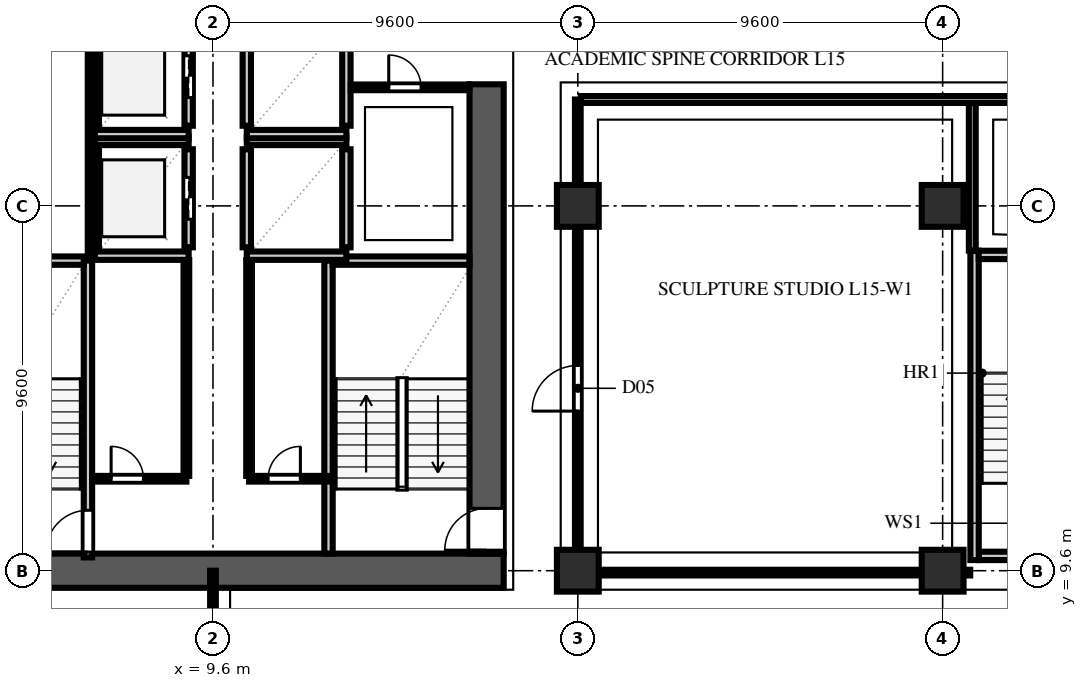
"""IFC4 building model, lengths in metres.
Left out: names, types, materials, properties, quantities, classifications, styles, units other than length and angle.
Written with IfcOpenShell. Run it as: python <this file> out.ifc"""

import sys

from ifc_helpers import new_model, si_unit, direction, frame, frame_2d, origin, origin_2d, place, context, subcontext, project, spatial, rectangle, extrude, element, fill, save


model = new_model("IFC4")
c1 = context("Model", 3, precision=1e-05, world=origin(), true_north=direction((0.0, 1.0)))
c2 = subcontext(c1, "Body", "Model", "MODEL_VIEW")
j1 = project(units=[si_unit("LENGTHUNIT", "METRE"), si_unit("PLANEANGLEUNIT", "RADIAN")], contexts=[c1])
p1 = place(None, origin())
s1 = spatial("IfcSite", under=j1, at=p1, CompositionType="ELEMENT")
p2 = place(p1, origin())
s2 = spatial("IfcBuilding", under=s1, at=p2, CompositionType="ELEMENT")
p3 = place(p2, frame((0.0, 0.0, 62.2)))
s3 = spatial("IfcBuildingStorey", under=s2, at=p3, CompositionType="ELEMENT", Elevation=62.2)
p4 = place(p3, frame((2.65, 9.6, 0.0), z_axis=(0.0, 0.0, 1.0), x_axis=(1.0, 0.0, 0.0)))
e1 = element("IfcWall", 1, at=p4, inside=s3, PredefinedType="SHEAR", context=c2, shape_type="SweptSolid", body=[
    extrude(rectangle(XDim=14.6, YDim=0.9, at=frame_2d((7.3, 0.0))), origin(), (0.0, 0.0, 1.0), 3.54),
])
p5 = place(p3, frame((16.8, 10.05, 0.0), z_axis=(0.0, 0.0, 1.0), x_axis=(0.0, 1.0, 0.0)))
e2 = element("IfcWall", 2, at=p5, inside=s3, PredefinedType="SHEAR", context=c2, shape_type="SweptSolid", body=[
    extrude(rectangle(XDim=12.35, YDim=0.9, at=frame_2d((6.175, 0.0))), origin(), (0.0, 0.0, 1.0), 3.54),
])
p6 = place(p5, frame((0.09, 0.0, 0.0)))
e3 = element("IfcOpeningElement", 3, at=p6, cuts=e2, PredefinedType="OPENING", context=c2, shape_type="SweptSolid", body=[
    extrude(rectangle(XDim=1.1, YDim=2.2, at=frame_2d((0.55, 1.1))), frame((0.0, 0.462, 0.0), z_axis=(0.0, -1.0, 0.0), x_axis=(1.0, 0.0, 0.0)), (0.0, 0.0, 1.0), 0.924),
])
for number, where, z_axis, x_axis in (
    (4, (19.2, 9.6, 0.0), (0.0, 0.0, 1.0), (1.0, 0.0, 0.0)),
    (5, (19.2, 19.2, 0.0), (0.0, 0.0, 1.0), (1.0, 0.0, 0.0)),
    (6, (28.8, 9.6, 0.0), (0.0, 0.0, 1.0), (1.0, 0.0, 0.0)),
    (7, (28.8, 19.2, 0.0), (0.0, 0.0, 1.0), (1.0, 0.0, 0.0)),
):
    element("IfcColumn", number, at=place(p3, frame(where, z_axis=z_axis, x_axis=x_axis)), inside=s3, PredefinedType="COLUMN", context=c2, shape_type="SweptSolid", body=[
        extrude(rectangle(XDim=1.1, YDim=1.1, at=origin_2d()), origin(), (0.0, 0.0, 1.0), 3.8),
    ])
p7 = place(p3, frame((6.31, 9.95, 0.0), z_axis=(0.0, 0.0, 1.0), x_axis=(0.0, 1.0, 0.0)))
e8 = element("IfcWall", 8, at=p7, inside=s3, PredefinedType="SOLIDWALL", context=c2, shape_type="SweptSolid", body=[
    extrude(rectangle(XDim=7.81, YDim=0.22, at=frame_2d((3.905, 0.0))), origin(), (0.0, 0.0, 1.0), 3.54),
])
p8 = place(p7, frame((0.14, 0.0, 0.0)))
e9 = element("IfcOpeningElement", 9, at=p8, cuts=e8, PredefinedType="OPENING", context=c2, shape_type="SweptSolid", body=[
    extrude(rectangle(XDim=1.1, YDim=2.2, at=frame_2d((0.55, 1.1))), frame((0.0, 0.122, 0.0), z_axis=(0.0, -1.0, 0.0), x_axis=(1.0, 0.0, 0.0)), (0.0, 0.0, 1.0), 0.244),
])
p9 = place(p3, frame((2.65, 17.76, 0.0), z_axis=(0.0, 0.0, 1.0), x_axis=(1.0, 0.0, 0.0)))
e10 = element("IfcWall", 10, at=p9, inside=s3, PredefinedType="SOLIDWALL", context=c2, shape_type="SweptSolid", body=[
    extrude(rectangle(XDim=3.55, YDim=0.22, at=frame_2d((1.775, 0.0))), origin(), (0.0, 0.0, 1.0), 3.54),
])
p10 = place(p3, frame((12.64, 10.05, 0.0), z_axis=(0.0, 0.0, 1.0), x_axis=(0.0, 1.0, 0.0)))
e11 = element("IfcWall", 11, at=p10, inside=s3, PredefinedType="SOLIDWALL", context=c2, shape_type="SweptSolid", body=[
    extrude(rectangle(XDim=7.71, YDim=0.22, at=frame_2d((3.855, 0.0))), origin(), (0.0, 0.0, 1.0), 3.54),
])
p11 = place(p3, frame((12.75, 17.76, 0.0), z_axis=(0.0, 0.0, 1.0), x_axis=(1.0, 0.0, 0.0)))
e12 = element("IfcWall", 12, at=p11, inside=s3, PredefinedType="SOLIDWALL", context=c2, shape_type="SweptSolid", body=[
    extrude(rectangle(XDim=3.6, YDim=0.22, at=frame_2d((1.8, 0.0))), origin(), (0.0, 0.0, 1.0), 3.54),
])
p12 = place(p3, frame((29.75, 9.99, 0.0), z_axis=(0.0, 0.0, 1.0), x_axis=(1.0, 0.0, 0.0)))
e13 = element("IfcWall", 13, at=p12, inside=s3, PredefinedType="SOLIDWALL", context=c2, shape_type="SweptSolid", body=[
    extrude(rectangle(XDim=3.65, YDim=0.22, at=frame_2d((1.825, 0.0))), origin(), (0.0, 0.0, 1.0), 3.54),
])
p13 = place(p12, frame((1.24, 0.0, 0.0)))
e14 = element("IfcOpeningElement", 14, at=p13, cuts=e13, PredefinedType="OPENING", context=c2, shape_type="SweptSolid", body=[
    extrude(rectangle(XDim=1.1, YDim=2.2, at=frame_2d((0.55, 1.1))), frame((0.0, 0.122, 0.0), z_axis=(0.0, -1.0, 0.0), x_axis=(1.0, 0.0, 0.0)), (0.0, 0.0, 1.0), 0.244),
])
p14 = place(p3, frame((29.64, 9.88, 0.0), z_axis=(0.0, 0.0, 1.0), x_axis=(0.0, 1.0, 0.0)))
e15 = element("IfcWall", 15, at=p14, inside=s3, PredefinedType="SOLIDWALL", context=c2, shape_type="SweptSolid", body=[
    extrude(rectangle(XDim=8.14, YDim=0.22, at=frame_2d((4.07, 0.0))), origin(), (0.0, 0.0, 1.0), 3.54),
])
p15 = place(p3, frame((29.75, 17.91, 0.0), z_axis=(0.0, 0.0, 1.0), x_axis=(1.0, 0.0, 0.0)))
e16 = element("IfcWall", 16, at=p15, inside=s3, PredefinedType="SOLIDWALL", context=c2, shape_type="SweptSolid", body=[
    extrude(rectangle(XDim=3.65, YDim=0.22, at=frame_2d((1.825, 0.0))), origin(), (0.0, 0.0, 1.0), 3.54),
])
p16 = place(p3, frame((6.49, 18.11, 0.0), z_axis=(0.0, 0.0, 1.0), x_axis=(0.0, 1.0, 0.0)))
e17 = element("IfcWall", 17, at=p16, inside=s3, PredefinedType="SOLIDWALL", context=c2, shape_type="SweptSolid", body=[
    extrude(rectangle(XDim=2.58, YDim=0.22, at=frame_2d((1.29, 0.0))), origin(), (0.0, 0.0, 1.0), 3.54),
])
p17 = place(p3, frame((8.96, 18.11, 0.0), z_axis=(0.0, 0.0, 1.0), x_axis=(0.0, 1.0, 0.0)))
e18 = element("IfcWall", 18, at=p17, inside=s3, PredefinedType="SOLIDWALL", context=c2, shape_type="SweptSolid", body=[
    extrude(rectangle(XDim=2.58, YDim=0.22, at=frame_2d((1.29, 0.0))), origin(), (0.0, 0.0, 1.0), 3.54),
])
p18 = place(p17, frame((0.74, 0.0, 0.0)))
e19 = element("IfcOpeningElement", 19, at=p18, cuts=e18, PredefinedType="OPENING", context=c2, shape_type="SweptSolid", body=[
    extrude(rectangle(XDim=1.1, YDim=2.2, at=frame_2d((0.55, 1.1))), frame((0.0, 0.122, 0.0), z_axis=(0.0, -1.0, 0.0), x_axis=(1.0, 0.0, 0.0)), (0.0, 0.0, 1.0), 0.244),
])
for number, where, z_axis, x_axis in (
    (20, (6.49, 17.89, 0.0), (0.0, 0.0, 1.0), (1.0, 0.0, 0.0)),
    (21, (6.49, 20.91, 0.0), (0.0, 0.0, 1.0), (1.0, 0.0, 0.0)),
):
    element("IfcWall", number, at=place(p3, frame(where, z_axis=z_axis, x_axis=x_axis)), inside=s3, PredefinedType="SOLIDWALL", context=c2, shape_type="SweptSolid", body=[
        extrude(rectangle(XDim=2.47, YDim=0.22, at=frame_2d((1.235, 0.0))), origin(), (0.0, 0.0, 1.0), 3.54),
    ])
p19 = place(p3, frame((6.49, 21.31, 0.0), z_axis=(0.0, 0.0, 1.0), x_axis=(0.0, 1.0, 0.0)))
e22 = element("IfcWall", 22, at=p19, inside=s3, PredefinedType="SOLIDWALL", context=c2, shape_type="SweptSolid", body=[
    extrude(rectangle(XDim=2.58, YDim=0.22, at=frame_2d((1.29, 0.0))), origin(), (0.0, 0.0, 1.0), 3.54),
])
p20 = place(p3, frame((8.96, 21.31, 0.0), z_axis=(0.0, 0.0, 1.0), x_axis=(0.0, 1.0, 0.0)))
e23 = element("IfcWall", 23, at=p20, inside=s3, PredefinedType="SOLIDWALL", context=c2, shape_type="SweptSolid", body=[
    extrude(rectangle(XDim=2.58, YDim=0.22, at=frame_2d((1.29, 0.0))), origin(), (0.0, 0.0, 1.0), 3.54),
])
p21 = place(p20, frame((0.74, 0.0, 0.0)))
e24 = element("IfcOpeningElement", 24, at=p21, cuts=e23, PredefinedType="OPENING", context=c2, shape_type="SweptSolid", body=[
    extrude(rectangle(XDim=1.1, YDim=2.2, at=frame_2d((0.55, 1.1))), frame((0.0, 0.122, 0.0), z_axis=(0.0, -1.0, 0.0), x_axis=(1.0, 0.0, 0.0)), (0.0, 0.0, 1.0), 0.244),
])
p22 = place(p3, frame((6.49, 21.09, 0.0), z_axis=(0.0, 0.0, 1.0), x_axis=(1.0, 0.0, 0.0)))
e25 = element("IfcWall", 25, at=p22, inside=s3, PredefinedType="SOLIDWALL", context=c2, shape_type="SweptSolid", body=[
    extrude(rectangle(XDim=2.47, YDim=0.22, at=frame_2d((1.235, 0.0))), origin(), (0.0, 0.0, 1.0), 3.54),
])
for number, where, z_axis, x_axis in (
    (26, (10.49, 18.11, 0.0), (0.0, 0.0, 1.0), (0.0, 1.0, 0.0)),
    (27, (13.11, 18.11, 0.0), (0.0, 0.0, 1.0), (0.0, 1.0, 0.0)),
):
    element("IfcWall", number, at=place(p3, frame(where, z_axis=z_axis, x_axis=x_axis)), inside=s3, PredefinedType="SOLIDWALL", context=c2, shape_type="SweptSolid", body=[
        extrude(rectangle(XDim=2.58, YDim=0.22, at=frame_2d((1.29, 0.0))), origin(), (0.0, 0.0, 1.0), 3.54),
    ])
for number, where, z_axis, x_axis in (
    (28, (10.49, 17.89, 0.0), (0.0, 0.0, 1.0), (1.0, 0.0, 0.0)),
    (29, (10.49, 20.91, 0.0), (0.0, 0.0, 1.0), (1.0, 0.0, 0.0)),
):
    element("IfcWall", number, at=place(p3, frame(where, z_axis=z_axis, x_axis=x_axis)), inside=s3, PredefinedType="SOLIDWALL", context=c2, shape_type="SweptSolid", body=[
        extrude(rectangle(XDim=2.62, YDim=0.22, at=frame_2d((1.31, 0.0))), origin(), (0.0, 0.0, 1.0), 3.54),
    ])
for number, where, z_axis, x_axis in (
    (30, (10.49, 21.31, 0.0), (0.0, 0.0, 1.0), (0.0, 1.0, 0.0)),
    (31, (13.11, 21.31, 0.0), (0.0, 0.0, 1.0), (0.0, 1.0, 0.0)),
):
    element("IfcWall", number, at=place(p3, frame(where, z_axis=z_axis, x_axis=x_axis)), inside=s3, PredefinedType="SOLIDWALL", context=c2, shape_type="SweptSolid", body=[
        extrude(rectangle(XDim=2.58, YDim=0.22, at=frame_2d((1.29, 0.0))), origin(), (0.0, 0.0, 1.0), 3.54),
    ])
p23 = place(p3, frame((10.49, 21.09, 0.0), z_axis=(0.0, 0.0, 1.0), x_axis=(1.0, 0.0, 0.0)))
e32 = element("IfcWall", 32, at=p23, inside=s3, PredefinedType="SOLIDWALL", context=c2, shape_type="SweptSolid", body=[
    extrude(rectangle(XDim=2.62, YDim=0.22, at=frame_2d((1.31, 0.0))), origin(), (0.0, 0.0, 1.0), 3.54),
])
p24 = place(p3, frame((6.42, 12.02, 0.0), z_axis=(0.0, 0.0, 1.0), x_axis=(1.0, 0.0, 0.0)))
e33 = element("IfcWall", 33, at=p24, inside=s3, PredefinedType="PARTITIONING", context=c2, shape_type="SweptSolid", body=[
    extrude(rectangle(XDim=2.48, YDim=0.15, at=frame_2d((1.24, 0.0))), origin(), (0.0, 0.0, 1.0), 3.54),
])
p25 = place(p24, frame((0.5, 0.0, 0.0)))
e34 = element("IfcOpeningElement", 34, at=p25, cuts=e33, PredefinedType="OPENING", context=c2, shape_type="SweptSolid", body=[
    extrude(rectangle(XDim=0.85, YDim=2.1, at=frame_2d((0.425, 1.05))), frame((0.0, 0.087, 0.0), z_axis=(0.0, -1.0, 0.0), x_axis=(1.0, 0.0, 0.0)), (0.0, 0.0, 1.0), 0.174),
])
p26 = place(p3, frame((10.55, 12.02, 0.0), z_axis=(0.0, 0.0, 1.0), x_axis=(1.0, 0.0, 0.0)))
e35 = element("IfcWall", 35, at=p26, inside=s3, PredefinedType="PARTITIONING", context=c2, shape_type="SweptSolid", body=[
    extrude(rectangle(XDim=2.08, YDim=0.15, at=frame_2d((1.04, 0.0))), origin(), (0.0, 0.0, 1.0), 3.54),
])
p27 = place(p26, frame((0.5, 0.0, 0.0)))
e36 = element("IfcOpeningElement", 36, at=p27, cuts=e35, PredefinedType="OPENING", context=c2, shape_type="SweptSolid", body=[
    extrude(rectangle(XDim=0.85, YDim=2.1, at=frame_2d((0.425, 1.05))), frame((0.0, 0.087, 0.0), z_axis=(0.0, -1.0, 0.0), x_axis=(1.0, 0.0, 0.0)), (0.0, 0.0, 1.0), 0.174),
])
for number, where, z_axis, x_axis in (
    (37, (8.9, 12.095, 0.0), (0.0, 0.0, 1.0), (0.0, 1.0, 0.0)),
    (38, (10.55, 12.095, 0.0), (0.0, 0.0, 1.0), (0.0, 1.0, 0.0)),
):
    element("IfcWall", number, at=place(p3, frame(where, z_axis=z_axis, x_axis=x_axis)), inside=s3, PredefinedType="PARTITIONING", context=c2, shape_type="SweptSolid", body=[
        extrude(rectangle(XDim=5.68, YDim=0.15, at=frame_2d((2.84, 0.0))), origin(), (0.0, 0.0, 1.0), 3.54),
    ])
p28 = place(p3, frame((13.225, 22.32, 0.0), z_axis=(0.0, 0.0, 1.0), x_axis=(1.0, 0.0, 0.0)))
e39 = element("IfcWall", 39, at=p28, inside=s3, PredefinedType="PARTITIONING", context=c2, shape_type="SweptSolid", body=[
    extrude(rectangle(XDim=3.12, YDim=0.15, at=frame_2d((1.56, 0.0))), origin(), (0.0, 0.0, 1.0), 3.54),
])
p29 = place(p28, frame((1.0, 0.0, 0.0)))
e40 = element("IfcOpeningElement", 40, at=p29, cuts=e39, PredefinedType="OPENING", context=c2, shape_type="SweptSolid", body=[
    extrude(rectangle(XDim=0.85, YDim=2.1, at=frame_2d((0.425, 1.05))), frame((0.0, 0.087, 0.0), z_axis=(0.0, -1.0, 0.0), x_axis=(1.0, 0.0, 0.0)), (0.0, 0.0, 1.0), 0.174),
])
p30 = place(p3, frame((6.38, 17.8, 0.0), z_axis=(0.0, 0.0, 1.0), x_axis=(0.0, 1.0, 0.0)))
e41 = element("IfcWall", 41, at=p30, inside=s3, PredefinedType="PARTITIONING", context=c2, shape_type="SweptSolid", body=[
    extrude(rectangle(XDim=18.98, YDim=0.15, at=frame_2d((9.49, 0.0))), origin(), (0.0, 0.0, 1.0), 3.54),
])
p31 = place(p30, frame((14.3, 0.0, 0.0)))
e42 = element("IfcOpeningElement", 42, at=p31, cuts=e41, PredefinedType="OPENING", context=c2, shape_type="SweptSolid", body=[
    extrude(rectangle(XDim=0.85, YDim=2.1, at=frame_2d((0.425, 1.05))), frame((0.0, 0.087, 0.0), z_axis=(0.0, -1.0, 0.0), x_axis=(1.0, 0.0, 0.0)), (0.0, 0.0, 1.0), 0.174),
])
p32 = place(p3, frame((9.6, 7.5, 0.0), z_axis=(0.0, 0.0, 1.0), x_axis=(0.0, 1.0, 0.0)))
e43 = element("IfcWall", 43, at=p32, inside=s3, PredefinedType="PARTITIONING", context=c2, shape_type="SweptSolid", body=[
    extrude(rectangle(XDim=2.1, YDim=0.15, at=frame_2d((1.05, 0.0))), origin(), (0.0, 0.0, 1.0), 2.923),
])
p33 = place(p3, frame((19.2, 9.55, 0.0), z_axis=(0.0, 0.0, 1.0), x_axis=(0.0, 1.0, 0.0)))
e44 = element("IfcWall", 44, at=p33, inside=s3, PredefinedType="PARTITIONING", context=c2, shape_type="SweptSolid", body=[
    extrude(rectangle(XDim=12.45, YDim=0.15, at=frame_2d((6.225, 0.0))), origin(), (0.0, 0.0, 1.0), 2.923),
])
p34 = place(p33, frame((4.25, 0.0, 0.0)))
e45 = element("IfcOpeningElement", 45, at=p34, cuts=e44, PredefinedType="OPENING", context=c2, shape_type="SweptSolid", body=[
    extrude(rectangle(XDim=1.2, YDim=2.2, at=frame_2d((0.6, 1.1))), frame((0.0, 0.087, 0.0), z_axis=(0.0, -1.0, 0.0), x_axis=(1.0, 0.0, 0.0)), (0.0, 0.0, 1.0), 0.174),
])
p35 = place(p3, frame((29.58, 18.025, 0.0), z_axis=(0.0, 0.0, 1.0), x_axis=(0.0, 1.0, 0.0)))
e46 = element("IfcWall", 46, at=p35, inside=s3, PredefinedType="PARTITIONING", context=c2, shape_type="SweptSolid", body=[
    extrude(rectangle(XDim=3.88, YDim=0.18, at=frame_2d((1.94, 0.0))), origin(), (0.0, 0.0, 1.0), 3.54),
])
p36 = place(p3, frame((19.28, 22.0, 0.0), z_axis=(0.0, 0.0, 1.0), x_axis=(1.0, 0.0, 0.0)))
e47 = element("IfcWall", 47, at=p36, inside=s3, PredefinedType="PARTITIONING", context=c2, shape_type="SweptSolid", body=[
    extrude(rectangle(XDim=35.695, YDim=0.18, at=frame_2d((17.848, 0.0))), origin(), (0.0, 0.0, 1.0), 3.54),
])
p37 = place(p36, frame((22.67, 0.0, 0.0)))
e48 = element("IfcOpeningElement", 48, at=p37, cuts=e47, PredefinedType="OPENING", context=c2, shape_type="SweptSolid", body=[
    extrude(rectangle(XDim=1.0, YDim=2.2, at=frame_2d((0.5, 1.1))), frame((0.0, 0.102, 0.0), z_axis=(0.0, -1.0, 0.0), x_axis=(1.0, 0.0, 0.0)), (0.0, 0.0, 1.0), 0.204),
])
p38 = place(p3, frame((19.28, 9.55, 0.0), z_axis=(0.0, 0.0, 1.0), x_axis=(1.0, 0.0, 0.0)))
e49 = element("IfcWall", 49, at=p38, inside=s3, PredefinedType="PARTITIONING", context=c2, shape_type="SweptSolid", body=[
    extrude(rectangle(XDim=10.245, YDim=0.15, at=frame_2d((5.123, 0.0))), origin(), (0.0, 0.0, 1.0), 2.923),
])
p39 = place(p8, origin())
e50 = element("IfcDoor", 50, at=p39, inside=s3, OperationType="SINGLE_SWING_LEFT", PredefinedType="DOOR", context=c2, shape_type="SweptSolid", body=[
    extrude(rectangle(XDim=1.1, YDim=2.2, at=frame_2d((0.55, 1.1))), frame((0.0, 0.025, 0.0), z_axis=(0.0, -1.0, 0.0), x_axis=(1.0, 0.0, 0.0)), (0.0, 0.0, 1.0), 0.05),
])
fill(e9, e50)
p40 = place(p6, origin())
e51 = element("IfcDoor", 51, at=p40, inside=s3, OperationType="SINGLE_SWING_LEFT", PredefinedType="DOOR", context=c2, shape_type="SweptSolid", body=[
    extrude(rectangle(XDim=1.1, YDim=2.2, at=frame_2d((0.55, 1.1))), frame((0.0, 0.025, 0.0), z_axis=(0.0, -1.0, 0.0), x_axis=(1.0, 0.0, 0.0)), (0.0, 0.0, 1.0), 0.05),
])
fill(e3, e51)
p41 = place(p18, origin())
e52 = element("IfcDoor", 52, at=p41, inside=s3, OperationType="DOUBLE_DOOR_SLIDING", PredefinedType="DOOR", context=c2, shape_type="SweptSolid", body=[
    extrude(rectangle(XDim=1.1, YDim=2.2, at=frame_2d((0.55, 1.1))), frame((0.0, 0.025, 0.0), z_axis=(0.0, -1.0, 0.0), x_axis=(1.0, 0.0, 0.0)), (0.0, 0.0, 1.0), 0.05),
])
fill(e19, e52)
p42 = place(p21, origin())
e53 = element("IfcDoor", 53, at=p42, inside=s3, OperationType="DOUBLE_DOOR_SLIDING", PredefinedType="DOOR", context=c2, shape_type="SweptSolid", body=[
    extrude(rectangle(XDim=1.1, YDim=2.2, at=frame_2d((0.55, 1.1))), frame((0.0, 0.025, 0.0), z_axis=(0.0, -1.0, 0.0), x_axis=(1.0, 0.0, 0.0)), (0.0, 0.0, 1.0), 0.05),
])
fill(e24, e53)
p43 = place(p25, origin())
e54 = element("IfcDoor", 54, at=p43, inside=s3, OperationType="SINGLE_SWING_LEFT", PredefinedType="DOOR", context=c2, shape_type="SweptSolid", body=[
    extrude(rectangle(XDim=0.85, YDim=2.1, at=frame_2d((0.425, 1.05))), frame((0.0, 0.025, 0.0), z_axis=(0.0, -1.0, 0.0), x_axis=(1.0, 0.0, 0.0)), (0.0, 0.0, 1.0), 0.05),
])
fill(e34, e54)
p44 = place(p27, origin())
e55 = element("IfcDoor", 55, at=p44, inside=s3, OperationType="SINGLE_SWING_RIGHT", PredefinedType="DOOR", context=c2, shape_type="SweptSolid", body=[
    extrude(rectangle(XDim=0.85, YDim=2.1, at=frame_2d((0.425, 1.05))), frame((0.0, 0.025, 0.0), z_axis=(0.0, -1.0, 0.0), x_axis=(1.0, 0.0, 0.0)), (0.0, 0.0, 1.0), 0.05),
])
fill(e36, e55)
p45 = place(p29, origin())
e56 = element("IfcDoor", 56, at=p45, inside=s3, OperationType="SINGLE_SWING_LEFT", PredefinedType="DOOR", context=c2, shape_type="SweptSolid", body=[
    extrude(rectangle(XDim=0.85, YDim=2.1, at=frame_2d((0.425, 1.05))), frame((0.0, 0.025, 0.0), z_axis=(0.0, -1.0, 0.0), x_axis=(1.0, 0.0, 0.0)), (0.0, 0.0, 1.0), 0.05),
])
fill(e40, e56)
p46 = place(p34, origin())
e57 = element("IfcDoor", 57, at=p46, inside=s3, OperationType="SINGLE_SWING_LEFT", PredefinedType="DOOR", context=c2, shape_type="SweptSolid", body=[
    extrude(rectangle(XDim=1.2, YDim=2.2, at=frame_2d((0.6, 1.1))), frame((0.0, 0.025, 0.0), z_axis=(0.0, -1.0, 0.0), x_axis=(1.0, 0.0, 0.0)), (0.0, 0.0, 1.0), 0.05),
])
fill(e45, e57)
save(model, sys.argv[1])
